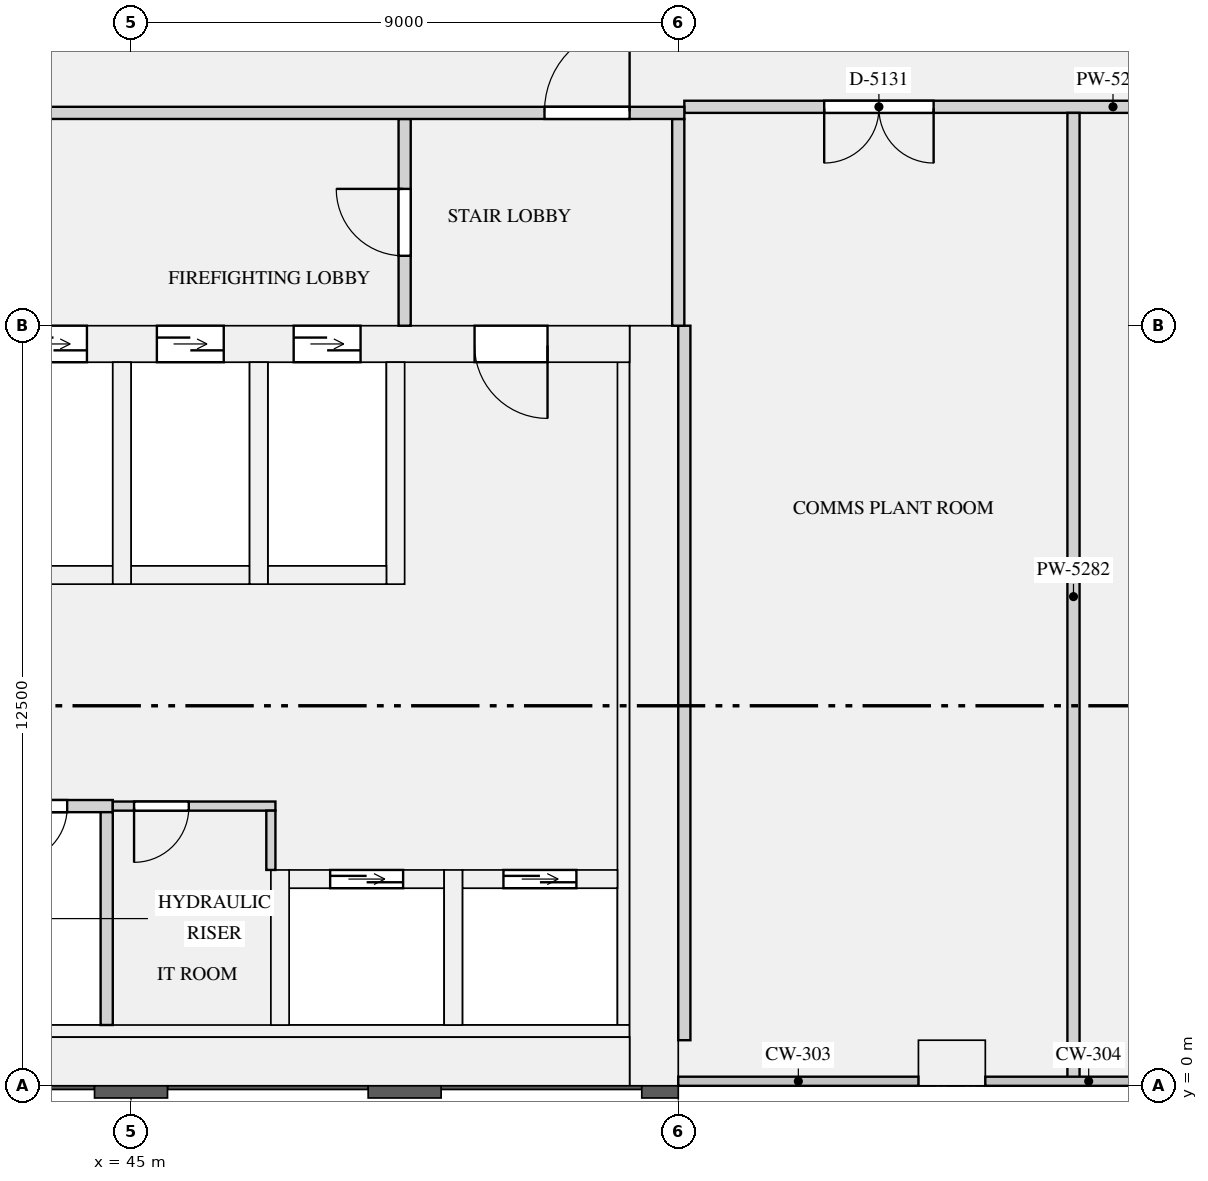
"""IFC4 building model, lengths in metres.
Left out: names, types, materials, properties, quantities, classifications, styles, units other than length and angle.
Written with IfcOpenShell. Run it as: python <this file> out.ifc"""

import sys

from ifc_helpers import new_model, si_unit, direction, frame, frame_2d, origin, origin_2d, place, context, subcontext, project, spatial, rectangle, extrude, element, fill, save


model = new_model("IFC4")
c1 = context("Model", 3, precision=1e-05, world=origin(), true_north=direction((0.0, 1.0)))
c2 = subcontext(c1, "Body", "Model", "MODEL_VIEW")
j1 = project(units=[si_unit("LENGTHUNIT", "METRE"), si_unit("PLANEANGLEUNIT", "RADIAN")], contexts=[c1])
p1 = place(None, origin())
s1 = spatial("IfcSite", under=j1, at=p1, CompositionType="ELEMENT")
p2 = place(p1, origin())
s2 = spatial("IfcBuilding", under=s1, at=p2, CompositionType="ELEMENT")
p3 = place(p2, frame((0.0, 0.0, 137.1)))
s3 = spatial("IfcBuildingStorey", under=s2, at=p3, CompositionType="ELEMENT", Elevation=137.1)
p4 = place(p3, frame((58.5, 0.375, 0.0), z_axis=(0.0, 0.0, 1.0), x_axis=(1.0, 0.0, 0.0)))
e1 = element("IfcColumn", 1, at=p4, inside=s3, PredefinedType="USERDEFINED", context=c2, shape_type="SweptSolid", body=[
    extrude(rectangle(XDim=1.1, YDim=0.75, at=origin_2d()), origin(), (0.0, 0.0, 1.0), 4.2),
])
p5 = place(p3, frame((53.6, 0.0, 0.0), z_axis=(0.0, 0.0, 1.0), x_axis=(0.0, 1.0, 0.0)))
e2 = element("IfcWall", 2, at=p5, inside=s3, PredefinedType="SHEAR", context=c2, shape_type="SweptSolid", body=[
    extrude(rectangle(XDim=12.5, YDim=0.8, at=frame_2d((6.25, 0.0))), origin(), (0.0, 0.0, 1.0), 4.2),
])
p6 = place(p3, frame((18.8, 0.4, 0.0), z_axis=(0.0, 0.0, 1.0), x_axis=(1.0, 0.0, 0.0)))
e3 = element("IfcWall", 3, at=p6, inside=s3, PredefinedType="SHEAR", context=c2, shape_type="SweptSolid", body=[
    extrude(rectangle(XDim=34.4, YDim=0.8, at=frame_2d((17.2, 0.0))), origin(), (0.0, 0.0, 1.0), 4.2),
])
p7 = place(p3, frame((18.8, 12.2, 0.0), z_axis=(0.0, 0.0, 1.0), x_axis=(1.0, 0.0, 0.0)))
e4 = element("IfcWall", 4, at=p7, inside=s3, PredefinedType="SHEAR", context=c2, shape_type="SweptSolid", body=[
    extrude(rectangle(XDim=34.4, YDim=0.6, at=frame_2d((17.2, 0.0))), origin(), (0.0, 0.0, 1.0), 4.2),
])
p8 = place(p7, frame((24.375, 0.0, 0.0)))
e5 = element("IfcOpeningElement", 5, at=p8, cuts=e4, PredefinedType="OPENING", context=c2, shape_type="SweptSolid", body=[
    extrude(rectangle(XDim=1.1, YDim=2.1, at=frame_2d((0.55, 1.05))), frame((0.0, 0.31, 0.0), z_axis=(0.0, -1.0, 0.0), x_axis=(1.0, 0.0, 0.0)), (0.0, 0.0, 1.0), 0.62),
])
p9 = place(p7, frame((26.625, 0.0, 0.0)))
e6 = element("IfcOpeningElement", 6, at=p9, cuts=e4, PredefinedType="OPENING", context=c2, shape_type="SweptSolid", body=[
    extrude(rectangle(XDim=1.1, YDim=2.1, at=frame_2d((0.55, 1.05))), frame((0.0, 0.31, 0.0), z_axis=(0.0, -1.0, 0.0), x_axis=(1.0, 0.0, 0.0)), (0.0, 0.0, 1.0), 0.62),
])
p10 = place(p7, frame((28.875, 0.0, 0.0)))
e7 = element("IfcOpeningElement", 7, at=p10, cuts=e4, PredefinedType="OPENING", context=c2, shape_type="SweptSolid", body=[
    extrude(rectangle(XDim=1.1, YDim=2.1, at=frame_2d((0.55, 1.05))), frame((0.0, 0.31, 0.0), z_axis=(0.0, -1.0, 0.0), x_axis=(1.0, 0.0, 0.0)), (0.0, 0.0, 1.0), 0.62),
])
p11 = place(p7, frame((18.4, 0.0, 0.0)))
e8 = element("IfcOpeningElement", 8, at=p11, cuts=e4, PredefinedType="OPENING", context=c2, shape_type="SweptSolid", body=[
    extrude(rectangle(XDim=0.9, YDim=2.1, at=frame_2d((0.45, 1.05))), frame((0.0, 0.31, 0.0), z_axis=(0.0, -1.0, 0.0), x_axis=(1.0, 0.0, 0.0)), (0.0, 0.0, 1.0), 0.62),
])
p12 = place(p7, frame((4.45, 0.0, 0.0)))
e9 = element("IfcOpeningElement", 9, at=p12, cuts=e4, PredefinedType="OPENING", context=c2, shape_type="SweptSolid", body=[
    extrude(rectangle(XDim=0.9, YDim=2.1, at=frame_2d((0.45, 1.05))), frame((0.0, 0.31, 0.0), z_axis=(0.0, -1.0, 0.0), x_axis=(1.0, 0.0, 0.0)), (0.0, 0.0, 1.0), 0.62),
])
p13 = place(p7, frame((1.35, 0.0, 0.0)))
e10 = element("IfcOpeningElement", 10, at=p13, cuts=e4, PredefinedType="OPENING", context=c2, shape_type="SweptSolid", body=[
    extrude(rectangle(XDim=1.2, YDim=2.1, at=frame_2d((0.6, 1.05))), frame((0.0, 0.31, 0.0), z_axis=(0.0, -1.0, 0.0), x_axis=(1.0, 0.0, 0.0)), (0.0, 0.0, 1.0), 0.62),
])
p14 = place(p7, frame((31.85, 0.0, 0.0)))
e11 = element("IfcOpeningElement", 11, at=p14, cuts=e4, PredefinedType="OPENING", context=c2, shape_type="SweptSolid", body=[
    extrude(rectangle(XDim=1.2, YDim=2.1, at=frame_2d((0.6, 1.05))), frame((0.0, 0.31, 0.0), z_axis=(0.0, -1.0, 0.0), x_axis=(1.0, 0.0, 0.0)), (0.0, 0.0, 1.0), 0.62),
])
p15 = place(p3, frame((53.1, 1.0, 0.0), z_axis=(0.0, 0.0, 1.0), x_axis=(0.0, 1.0, 0.0)))
e12 = element("IfcWall", 12, at=p15, inside=s3, PredefinedType="SHEAR", context=c2, shape_type="SweptSolid", body=[
    extrude(rectangle(XDim=10.9, YDim=0.2, at=frame_2d((5.45, 0.0))), origin(), (0.0, 0.0, 1.0), 4.2),
])
p16 = place(p3, frame((18.8, 0.9, 0.0), z_axis=(0.0, 0.0, 1.0), x_axis=(1.0, 0.0, 0.0)))
e13 = element("IfcWall", 13, at=p16, inside=s3, PredefinedType="SHEAR", context=c2, shape_type="SweptSolid", body=[
    extrude(rectangle(XDim=34.4, YDim=0.2, at=frame_2d((17.2, 0.0))), origin(), (0.0, 0.0, 1.0), 4.2),
])
for number, where, z_axis, x_axis in (
    (14, (42.75, 8.4, 0.0), (0.0, 0.0, 1.0), (1.0, 0.0, 0.0)),
    (15, (45.0, 8.4, 0.0), (0.0, 0.0, 1.0), (1.0, 0.0, 0.0)),
):
    element("IfcWall", number, at=place(p3, frame(where, z_axis=z_axis, x_axis=x_axis)), inside=s3, PredefinedType="SHEAR", context=c2, shape_type="SweptSolid", body=[
        extrude(rectangle(XDim=1.95, YDim=0.3, at=frame_2d((0.975, 0.0))), origin(), (0.0, 0.0, 1.0), 4.2),
    ])
p17 = place(p3, frame((44.85, 8.25, 0.0), z_axis=(0.0, 0.0, 1.0), x_axis=(0.0, 1.0, 0.0)))
e16 = element("IfcWall", 16, at=p17, inside=s3, PredefinedType="SHEAR", context=c2, shape_type="SweptSolid", body=[
    extrude(rectangle(XDim=3.65, YDim=0.3, at=frame_2d((1.825, 0.0))), origin(), (0.0, 0.0, 1.0), 4.2),
])
p18 = place(p3, frame((47.25, 8.4, 0.0), z_axis=(0.0, 0.0, 1.0), x_axis=(1.0, 0.0, 0.0)))
e17 = element("IfcWall", 17, at=p18, inside=s3, PredefinedType="SHEAR", context=c2, shape_type="SweptSolid", body=[
    extrude(rectangle(XDim=1.95, YDim=0.3, at=frame_2d((0.975, 0.0))), origin(), (0.0, 0.0, 1.0), 4.2),
])
for number, where, z_axis, x_axis in (
    (18, (47.1, 8.25, 0.0), (0.0, 0.0, 1.0), (0.0, 1.0, 0.0)),
    (19, (49.35, 8.25, 0.0), (0.0, 0.0, 1.0), (0.0, 1.0, 0.0)),
):
    element("IfcWall", number, at=place(p3, frame(where, z_axis=z_axis, x_axis=x_axis)), inside=s3, PredefinedType="SHEAR", context=c2, shape_type="SweptSolid", body=[
        extrude(rectangle(XDim=3.65, YDim=0.3, at=frame_2d((1.825, 0.0))), origin(), (0.0, 0.0, 1.0), 4.2),
    ])
p19 = place(p3, frame((47.6, 3.4, 0.0), z_axis=(0.0, 0.0, 1.0), x_axis=(1.0, 0.0, 0.0)))
e20 = element("IfcWall", 20, at=p19, inside=s3, PredefinedType="SHEAR", context=c2, shape_type="SweptSolid", body=[
    extrude(rectangle(XDim=2.55, YDim=0.3, at=frame_2d((1.275, 0.0))), origin(), (0.0, 0.0, 1.0), 4.2),
])
p20 = place(p19, frame((0.675, 0.0, 0.0)))
e21 = element("IfcOpeningElement", 21, at=p20, cuts=e20, PredefinedType="OPENING", context=c2, shape_type="SweptSolid", body=[
    extrude(rectangle(XDim=1.2, YDim=2.1, at=frame_2d((0.6, 1.05))), frame((0.0, 0.16, 0.0), z_axis=(0.0, -1.0, 0.0), x_axis=(1.0, 0.0, 0.0)), (0.0, 0.0, 1.0), 0.32),
])
p21 = place(p3, frame((47.45, 1.0, 0.0), z_axis=(0.0, 0.0, 1.0), x_axis=(0.0, 1.0, 0.0)))
e22 = element("IfcWall", 22, at=p21, inside=s3, PredefinedType="SHEAR", context=c2, shape_type="SweptSolid", body=[
    extrude(rectangle(XDim=2.55, YDim=0.3, at=frame_2d((1.275, 0.0))), origin(), (0.0, 0.0, 1.0), 4.2),
])
p22 = place(p3, frame((50.45, 3.4, 0.0), z_axis=(0.0, 0.0, 1.0), x_axis=(1.0, 0.0, 0.0)))
e23 = element("IfcWall", 23, at=p22, inside=s3, PredefinedType="SHEAR", context=c2, shape_type="SweptSolid", body=[
    extrude(rectangle(XDim=2.55, YDim=0.3, at=frame_2d((1.275, 0.0))), origin(), (0.0, 0.0, 1.0), 4.2),
])
p23 = place(p22, frame((0.675, 0.0, 0.0)))
e24 = element("IfcOpeningElement", 24, at=p23, cuts=e23, PredefinedType="OPENING", context=c2, shape_type="SweptSolid", body=[
    extrude(rectangle(XDim=1.2, YDim=2.1, at=frame_2d((0.6, 1.05))), frame((0.0, 0.16, 0.0), z_axis=(0.0, -1.0, 0.0), x_axis=(1.0, 0.0, 0.0)), (0.0, 0.0, 1.0), 0.32),
])
p24 = place(p3, frame((50.3, 1.0, 0.0), z_axis=(0.0, 0.0, 1.0), x_axis=(0.0, 1.0, 0.0)))
e25 = element("IfcWall", 25, at=p24, inside=s3, PredefinedType="SHEAR", context=c2, shape_type="SweptSolid", body=[
    extrude(rectangle(XDim=2.55, YDim=0.3, at=frame_2d((1.275, 0.0))), origin(), (0.0, 0.0, 1.0), 4.2),
])
p25 = place(p3, frame((40.2, 4.6, 0.0), z_axis=(0.0, 0.0, 1.0), x_axis=(1.0, 0.0, 0.0)))
e26 = element("IfcWall", 26, at=p25, inside=s3, PredefinedType="PARTITIONING", context=c2, shape_type="SweptSolid", body=[
    extrude(rectangle(XDim=4.5, YDim=0.2, at=frame_2d((2.25, 0.0))), origin(), (0.0, 0.0, 1.0), 3.7),
])
p26 = place(p25, frame((0.65, 0.0, 0.0)))
e27 = element("IfcOpeningElement", 27, at=p26, cuts=e26, PredefinedType="OPENING", context=c2, shape_type="SweptSolid", body=[
    extrude(rectangle(XDim=0.9, YDim=2.1, at=frame_2d((0.45, 1.05))), frame((0.0, 0.11, 0.0), z_axis=(0.0, -1.0, 0.0), x_axis=(1.0, 0.0, 0.0)), (0.0, 0.0, 1.0), 0.22),
])
p27 = place(p25, frame((2.85, 0.0, 0.0)))
e28 = element("IfcOpeningElement", 28, at=p27, cuts=e26, PredefinedType="OPENING", context=c2, shape_type="SweptSolid", body=[
    extrude(rectangle(XDim=0.9, YDim=2.1, at=frame_2d((0.45, 1.05))), frame((0.0, 0.11, 0.0), z_axis=(0.0, -1.0, 0.0), x_axis=(1.0, 0.0, 0.0)), (0.0, 0.0, 1.0), 0.22),
])
p28 = place(p3, frame((44.7, 4.6, 0.0), z_axis=(0.0, 0.0, 1.0), x_axis=(1.0, 0.0, 0.0)))
e29 = element("IfcWall", 29, at=p28, inside=s3, PredefinedType="PARTITIONING", context=c2, shape_type="SweptSolid", body=[
    extrude(rectangle(XDim=2.675, YDim=0.15, at=frame_2d((1.337, 0.0))), origin(), (0.0, 0.0, 1.0), 3.7),
])
p29 = place(p28, frame((0.35, 0.0, 0.0)))
e30 = element("IfcOpeningElement", 30, at=p29, cuts=e29, PredefinedType="OPENING", context=c2, shape_type="SweptSolid", body=[
    extrude(rectangle(XDim=0.9, YDim=2.1, at=frame_2d((0.45, 1.05))), frame((0.0, 0.085, 0.0), z_axis=(0.0, -1.0, 0.0), x_axis=(1.0, 0.0, 0.0)), (0.0, 0.0, 1.0), 0.17),
])
p30 = place(p3, frame((44.6, 1.0, 0.0), z_axis=(0.0, 0.0, 1.0), x_axis=(0.0, 1.0, 0.0)))
e31 = element("IfcWall", 31, at=p30, inside=s3, PredefinedType="PARTITIONING", context=c2, shape_type="SweptSolid", body=[
    extrude(rectangle(XDim=3.5, YDim=0.2, at=frame_2d((1.75, 0.0))), origin(), (0.0, 0.0, 1.0), 3.7),
])
p31 = place(p3, frame((47.3, 3.55, 0.0), z_axis=(0.0, 0.0, 1.0), x_axis=(0.0, 1.0, 0.0)))
e32 = element("IfcWall", 32, at=p31, inside=s3, PredefinedType="PARTITIONING", context=c2, shape_type="SweptSolid", body=[
    extrude(rectangle(XDim=0.975, YDim=0.15, at=frame_2d((0.487, 0.0))), origin(), (0.0, 0.0, 1.0), 3.7),
])
p32 = place(p3, frame((49.5, 12.5, 0.0), z_axis=(0.0, 0.0, 1.0), x_axis=(0.0, 1.0, 0.0)))
e33 = element("IfcWall", 33, at=p32, inside=s3, PredefinedType="PARTITIONING", context=c2, shape_type="SweptSolid", body=[
    extrude(rectangle(XDim=3.4, YDim=0.2, at=frame_2d((1.7, 0.0))), origin(), (0.0, 0.0, 1.0), 3.7),
])
p33 = place(p32, frame((1.15, 0.0, 0.0)))
e34 = element("IfcOpeningElement", 34, at=p33, cuts=e33, PredefinedType="OPENING", context=c2, shape_type="SweptSolid", body=[
    extrude(rectangle(XDim=1.1, YDim=2.1, at=frame_2d((0.55, 1.05))), frame((0.0, 0.11, 0.0), z_axis=(0.0, -1.0, 0.0), x_axis=(1.0, 0.0, 0.0)), (0.0, 0.0, 1.0), 0.22),
])
p34 = place(p3, frame((54.0, 12.5, 0.0), z_axis=(0.0, 0.0, 1.0), x_axis=(0.0, 1.0, 0.0)))
e35 = element("IfcWall", 35, at=p34, inside=s3, PredefinedType="PARTITIONING", context=c2, shape_type="SweptSolid", body=[
    extrude(rectangle(XDim=3.4, YDim=0.2, at=frame_2d((1.7, 0.0))), origin(), (0.0, 0.0, 1.0), 3.7),
])
p35 = place(p3, frame((17.9, 16.0, 0.0), z_axis=(0.0, 0.0, 1.0), x_axis=(1.0, 0.0, 0.0)))
e36 = element("IfcWall", 36, at=p35, inside=s3, PredefinedType="PARTITIONING", context=c2, shape_type="SweptSolid", body=[
    extrude(rectangle(XDim=36.2, YDim=0.2, at=frame_2d((18.1, 0.0))), origin(), (0.0, 0.0, 1.0), 3.7),
])
p36 = place(p35, frame((0.9, 0.0, 0.0)))
e37 = element("IfcOpeningElement", 37, at=p36, cuts=e36, PredefinedType="OPENING", context=c2, shape_type="SweptSolid", body=[
    extrude(rectangle(XDim=1.4, YDim=2.1, at=frame_2d((0.7, 1.05))), frame((0.0, 0.11, 0.0), z_axis=(0.0, -1.0, 0.0), x_axis=(1.0, 0.0, 0.0)), (0.0, 0.0, 1.0), 0.22),
])
p37 = place(p35, frame((33.9, 0.0, 0.0)))
e38 = element("IfcOpeningElement", 38, at=p37, cuts=e36, PredefinedType="OPENING", context=c2, shape_type="SweptSolid", body=[
    extrude(rectangle(XDim=1.4, YDim=2.1, at=frame_2d((0.7, 1.05))), frame((0.0, 0.11, 0.0), z_axis=(0.0, -1.0, 0.0), x_axis=(1.0, 0.0, 0.0)), (0.0, 0.0, 1.0), 0.22),
])
p38 = place(p3, frame((54.1, 16.1, 0.0), z_axis=(0.0, 0.0, 1.0), x_axis=(1.0, 0.0, 0.0)))
e39 = element("IfcWall", 39, at=p38, inside=s3, PredefinedType="PARTITIONING", context=c2, shape_type="SweptSolid", body=[
    extrude(rectangle(XDim=16.075, YDim=0.2, at=frame_2d((8.038, 0.0))), origin(), (0.0, 0.0, 1.0), 3.7),
])
p39 = place(p38, frame((2.3, 0.0, 0.0)))
e40 = element("IfcOpeningElement", 40, at=p39, cuts=e39, PredefinedType="OPENING", context=c2, shape_type="SweptSolid", body=[
    extrude(rectangle(XDim=1.8, YDim=2.1, at=frame_2d((0.9, 1.05))), frame((0.0, 0.11, 0.0), z_axis=(0.0, -1.0, 0.0), x_axis=(1.0, 0.0, 0.0)), (0.0, 0.0, 1.0), 0.22),
])
p40 = place(p38, frame((10.0, 0.0, 0.0)))
e41 = element("IfcOpeningElement", 41, at=p40, cuts=e39, PredefinedType="OPENING", context=c2, shape_type="SweptSolid", body=[
    extrude(rectangle(XDim=1.8, YDim=2.1, at=frame_2d((0.9, 1.05))), frame((0.0, 0.11, 0.0), z_axis=(0.0, -1.0, 0.0), x_axis=(1.0, 0.0, 0.0)), (0.0, 0.0, 1.0), 0.22),
])
p41 = place(p3, frame((54.1, 0.75, 0.0), z_axis=(0.0, 0.0, 1.0), x_axis=(0.0, 1.0, 0.0)))
e42 = element("IfcWall", 42, at=p41, inside=s3, PredefinedType="PARTITIONING", context=c2, shape_type="SweptSolid", body=[
    extrude(rectangle(XDim=11.75, YDim=0.2, at=frame_2d((5.875, 0.0))), origin(), (0.0, 0.0, 1.0), 3.7),
])
p42 = place(p3, frame((60.5, 0.09, 0.0), z_axis=(0.0, 0.0, 1.0), x_axis=(0.0, 1.0, 0.0)))
e43 = element("IfcWall", 43, at=p42, inside=s3, PredefinedType="PARTITIONING", context=c2, shape_type="SweptSolid", body=[
    extrude(rectangle(XDim=15.91, YDim=0.2, at=frame_2d((7.955, 0.0))), origin(), (0.0, 0.0, 1.0), 3.7),
])
p43 = place(p20, origin())
e44 = element("IfcDoor", 44, at=p43, inside=s3, OperationType="DOUBLE_DOOR_SLIDING", PredefinedType="DOOR", context=c2, shape_type="SweptSolid", body=[
    extrude(rectangle(XDim=1.2, YDim=2.1, at=frame_2d((0.6, 1.05))), frame((0.0, 0.025, 0.0), z_axis=(0.0, -1.0, 0.0), x_axis=(1.0, 0.0, 0.0)), (0.0, 0.0, 1.0), 0.05),
])
fill(e21, e44)
p44 = place(p23, origin())
e45 = element("IfcDoor", 45, at=p44, inside=s3, OperationType="DOUBLE_DOOR_SLIDING", PredefinedType="DOOR", context=c2, shape_type="SweptSolid", body=[
    extrude(rectangle(XDim=1.2, YDim=2.1, at=frame_2d((0.6, 1.05))), frame((0.0, 0.025, 0.0), z_axis=(0.0, -1.0, 0.0), x_axis=(1.0, 0.0, 0.0)), (0.0, 0.0, 1.0), 0.05),
])
fill(e24, e45)
p45 = place(p8, origin())
e46 = element("IfcDoor", 46, at=p45, inside=s3, OperationType="DOUBLE_DOOR_SLIDING", PredefinedType="DOOR", context=c2, shape_type="SweptSolid", body=[
    extrude(rectangle(XDim=1.1, YDim=2.1, at=frame_2d((0.55, 1.05))), frame((0.0, 0.025, 0.0), z_axis=(0.0, -1.0, 0.0), x_axis=(1.0, 0.0, 0.0)), (0.0, 0.0, 1.0), 0.05),
])
fill(e5, e46)
p46 = place(p9, origin())
e47 = element("IfcDoor", 47, at=p46, inside=s3, OperationType="DOUBLE_DOOR_SLIDING", PredefinedType="DOOR", context=c2, shape_type="SweptSolid", body=[
    extrude(rectangle(XDim=1.1, YDim=2.1, at=frame_2d((0.55, 1.05))), frame((0.0, 0.025, 0.0), z_axis=(0.0, -1.0, 0.0), x_axis=(1.0, 0.0, 0.0)), (0.0, 0.0, 1.0), 0.05),
])
fill(e6, e47)
p47 = place(p10, origin())
e48 = element("IfcDoor", 48, at=p47, inside=s3, OperationType="DOUBLE_DOOR_SLIDING", PredefinedType="DOOR", context=c2, shape_type="SweptSolid", body=[
    extrude(rectangle(XDim=1.1, YDim=2.1, at=frame_2d((0.55, 1.05))), frame((0.0, 0.025, 0.0), z_axis=(0.0, -1.0, 0.0), x_axis=(1.0, 0.0, 0.0)), (0.0, 0.0, 1.0), 0.05),
])
fill(e7, e48)
p48 = place(p29, frame((0.9, 0.0, 0.0), z_axis=(0.0, 0.0, 1.0), x_axis=(-1.0, 0.0, 0.0)))
e49 = element("IfcDoor", 49, at=p48, inside=s3, OperationType="SINGLE_SWING_RIGHT", PredefinedType="DOOR", context=c2, shape_type="SweptSolid", body=[
    extrude(rectangle(XDim=0.9, YDim=2.1, at=frame_2d((0.45, 1.05))), frame((0.0, 0.025, 0.0), z_axis=(0.0, -1.0, 0.0), x_axis=(1.0, 0.0, 0.0)), (0.0, 0.0, 1.0), 0.05),
])
fill(e30, e49)
p49 = place(p27, frame((0.9, 0.0, 0.0), z_axis=(0.0, 0.0, 1.0), x_axis=(-1.0, 0.0, 0.0)))
e50 = element("IfcDoor", 50, at=p49, inside=s3, OperationType="SINGLE_SWING_RIGHT", PredefinedType="DOOR", context=c2, shape_type="SweptSolid", body=[
    extrude(rectangle(XDim=0.9, YDim=2.1, at=frame_2d((0.45, 1.05))), frame((0.0, 0.025, 0.0), z_axis=(0.0, -1.0, 0.0), x_axis=(1.0, 0.0, 0.0)), (0.0, 0.0, 1.0), 0.05),
])
fill(e28, e50)
p50 = place(p14, frame((1.2, 0.0, 0.0), z_axis=(0.0, 0.0, 1.0), x_axis=(-1.0, 0.0, 0.0)))
e51 = element("IfcDoor", 51, at=p50, inside=s3, OperationType="SINGLE_SWING_LEFT", PredefinedType="DOOR", context=c2, shape_type="SweptSolid", body=[
    extrude(rectangle(XDim=1.2, YDim=2.1, at=frame_2d((0.6, 1.05))), frame((0.0, 0.025, 0.0), z_axis=(0.0, -1.0, 0.0), x_axis=(1.0, 0.0, 0.0)), (0.0, 0.0, 1.0), 0.05),
])
fill(e11, e51)
p51 = place(p33, origin())
e52 = element("IfcDoor", 52, at=p51, inside=s3, OperationType="SINGLE_SWING_RIGHT", PredefinedType="DOOR", context=c2, shape_type="SweptSolid", body=[
    extrude(rectangle(XDim=1.1, YDim=2.1, at=frame_2d((0.55, 1.05))), frame((0.0, 0.025, 0.0), z_axis=(0.0, -1.0, 0.0), x_axis=(1.0, 0.0, 0.0)), (0.0, 0.0, 1.0), 0.05),
])
fill(e34, e52)
p52 = place(p37, origin())
e53 = element("IfcDoor", 53, at=p52, inside=s3, OperationType="SINGLE_SWING_RIGHT", PredefinedType="DOOR", context=c2, shape_type="SweptSolid", body=[
    extrude(rectangle(XDim=1.4, YDim=2.1, at=frame_2d((0.7, 1.05))), frame((0.0, 0.025, 0.0), z_axis=(0.0, -1.0, 0.0), x_axis=(1.0, 0.0, 0.0)), (0.0, 0.0, 1.0), 0.05),
])
fill(e38, e53)
p53 = place(p39, frame((1.8, 0.0, 0.0), z_axis=(0.0, 0.0, 1.0), x_axis=(-1.0, 0.0, 0.0)))
e54 = element("IfcDoor", 54, at=p53, inside=s3, OperationType="DOUBLE_DOOR_SINGLE_SWING", PredefinedType="DOOR", context=c2, shape_type="SweptSolid", body=[
    extrude(rectangle(XDim=1.8, YDim=2.1, at=frame_2d((0.9, 1.05))), frame((0.0, 0.025, 0.0), z_axis=(0.0, -1.0, 0.0), x_axis=(1.0, 0.0, 0.0)), (0.0, 0.0, 1.0), 0.05),
])
fill(e40, e54)
save(model, sys.argv[1])
